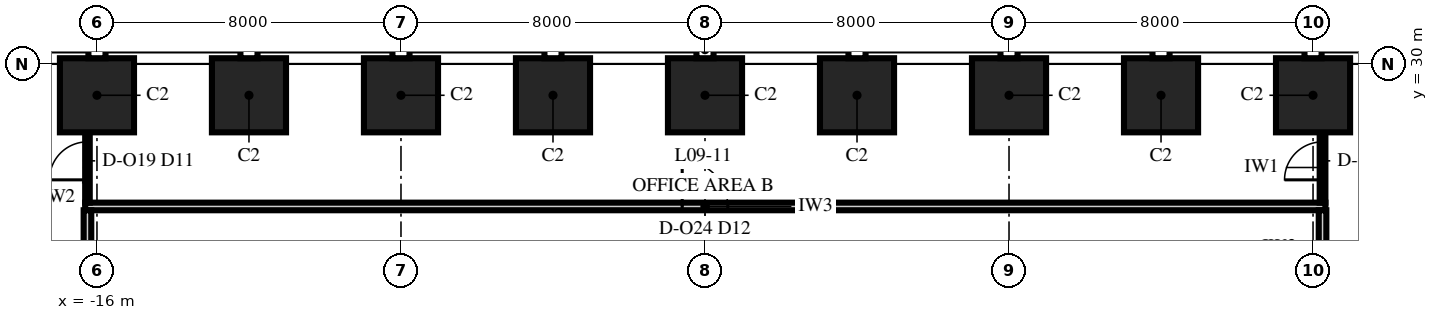
"""IFC4 building model, lengths in metres.
Left out: names, types, materials, properties, quantities, classifications, styles, units other than length and angle.
Written with IfcOpenShell. Run it as: python <this file> out.ifc"""

import sys

from ifc_helpers import new_model, si_unit, direction, frame, frame_2d, origin, origin_2d, place, context, subcontext, project, spatial, rectangle, extrude, element, fill, save


model = new_model("IFC4")
c1 = context("Model", 3, precision=1e-05, world=origin(), true_north=direction((0.0, 1.0)))
c2 = subcontext(c1, "Body", "Model", "MODEL_VIEW")
j1 = project(units=[si_unit("LENGTHUNIT", "METRE"), si_unit("PLANEANGLEUNIT", "RADIAN")], contexts=[c1])
p1 = place(None, origin())
s1 = spatial("IfcSite", under=j1, at=p1, CompositionType="ELEMENT")
p2 = place(p1, origin())
s2 = spatial("IfcBuilding", under=s1, at=p2, CompositionType="ELEMENT")
p3 = place(p2, frame((0.0, 0.0, 48.0)))
s3 = spatial("IfcBuildingStorey", under=s2, at=p3, CompositionType="ELEMENT", Elevation=48.0)
for number, where, z_axis, x_axis in (
    (1, (16.0, 29.175, 0.0), (0.0, 0.0, 1.0), (-1.0, 0.0, 0.0)),
    (2, (12.0, 29.175, 0.0), (0.0, 0.0, 1.0), (-1.0, 0.0, 0.0)),
    (3, (8.0, 29.175, 0.0), (0.0, 0.0, 1.0), (-1.0, 0.0, 0.0)),
    (4, (4.0, 29.175, 0.0), (0.0, 0.0, 1.0), (-1.0, 0.0, 0.0)),
    (5, (0.0, 29.175, 0.0), (0.0, 0.0, 1.0), (-1.0, 0.0, 0.0)),
    (6, (-4.0, 29.175, 0.0), (0.0, 0.0, 1.0), (-1.0, 0.0, 0.0)),
    (7, (-8.0, 29.175, 0.0), (0.0, 0.0, 1.0), (-1.0, 0.0, 0.0)),
    (8, (-12.0, 29.175, 0.0), (0.0, 0.0, 1.0), (-1.0, 0.0, 0.0)),
    (9, (-16.0, 29.175, 0.0), (0.0, 0.0, 1.0), (-1.0, 0.0, 0.0)),
):
    element("IfcColumn", number, at=place(p3, frame(where, z_axis=z_axis, x_axis=x_axis)), inside=s3, PredefinedType="COLUMN", context=c2, shape_type="SweptSolid", body=[
        extrude(rectangle(XDim=1.95, YDim=1.95, at=origin_2d()), origin(), (0.0, 0.0, 1.0), 4.0),
    ])
p4 = place(p3, frame((-16.31, 26.25, 0.0), z_axis=(0.0, 0.0, 1.0), x_axis=(1.0, 0.0, 0.0)))
e10 = element("IfcWall", 10, at=p4, inside=s3, PredefinedType="PARTITIONING", context=c2, shape_type="SweptSolid", body=[
    extrude(rectangle(XDim=32.635, YDim=0.2, at=frame_2d((16.317, 0.0))), origin(), (0.0, 0.0, 1.0), 3.4),
])
p5 = place(p4, frame((15.71, 0.0, 0.0)))
e11 = element("IfcOpeningElement", 11, at=p5, cuts=e10, PredefinedType="OPENING", context=c2, shape_type="SweptSolid", body=[
    extrude(rectangle(XDim=1.2, YDim=2.4, at=frame_2d((0.6, 1.2))), frame((0.0, 0.115, 0.0), z_axis=(0.0, -1.0, 0.0), x_axis=(1.0, 0.0, 0.0)), (0.0, 0.0, 1.0), 0.23),
])
p6 = place(p3, frame((-16.25, 3.85, 0.0), z_axis=(0.0, 0.0, 1.0), x_axis=(0.0, 1.0, 0.0)))
e12 = element("IfcWall", 12, at=p6, inside=s3, PredefinedType="PARTITIONING", context=c2, shape_type="SweptSolid", body=[
    extrude(rectangle(XDim=22.3, YDim=0.2, at=frame_2d((11.15, 0.0))), origin(), (0.0, 0.0, 1.0), 2.842),
])
p7 = place(p6, frame((4.55, 0.0, 0.0)))
e13 = element("IfcOpeningElement", 13, at=p7, cuts=e12, PredefinedType="OPENING", context=c2, shape_type="SweptSolid", body=[
    extrude(rectangle(XDim=1.2, YDim=2.4, at=frame_2d((0.6, 1.2))), frame((0.0, 0.115, 0.0), z_axis=(0.0, -1.0, 0.0), x_axis=(1.0, 0.0, 0.0)), (0.0, 0.0, 1.0), 0.23),
])
p8 = place(p3, frame((-16.25, 26.35, 0.0), z_axis=(0.0, 0.0, 1.0), x_axis=(0.0, 1.0, 0.0)))
e14 = element("IfcWall", 14, at=p8, inside=s3, PredefinedType="PARTITIONING", context=c2, shape_type="SweptSolid", body=[
    extrude(rectangle(XDim=1.85, YDim=0.12, at=frame_2d((0.925, 0.0))), origin(), (0.0, 0.0, 1.0), 3.85),
])
p9 = place(p8, frame((0.6, 0.0, 0.0)))
e15 = element("IfcOpeningElement", 15, at=p9, cuts=e14, PredefinedType="OPENING", context=c2, shape_type="SweptSolid", body=[
    extrude(rectangle(XDim=1.0, YDim=2.4, at=frame_2d((0.5, 1.2))), frame((0.0, 0.075, 0.0), z_axis=(0.0, -1.0, 0.0), x_axis=(1.0, 0.0, 0.0)), (0.0, 0.0, 1.0), 0.15),
])
p10 = place(p3, frame((16.25, 21.94, 0.0), z_axis=(0.0, 0.0, 1.0), x_axis=(0.0, 1.0, 0.0)))
e16 = element("IfcWall", 16, at=p10, inside=s3, PredefinedType="PARTITIONING", context=c2, shape_type="SweptSolid", body=[
    extrude(rectangle(XDim=4.21, YDim=0.2, at=frame_2d((2.105, 0.0))), origin(), (0.0, 0.0, 1.0), 3.4),
])
p11 = place(p3, frame((16.25, 26.35, 0.0), z_axis=(0.0, 0.0, 1.0), x_axis=(0.0, 1.0, 0.0)))
e17 = element("IfcWall", 17, at=p11, inside=s3, PredefinedType="PARTITIONING", context=c2, shape_type="SweptSolid", body=[
    extrude(rectangle(XDim=1.85, YDim=0.15, at=frame_2d((0.925, 0.0))), origin(), (0.0, 0.0, 1.0), 3.85),
])
p12 = place(p11, frame((0.6, 0.0, 0.0)))
e18 = element("IfcOpeningElement", 18, at=p12, cuts=e17, PredefinedType="OPENING", context=c2, shape_type="SweptSolid", body=[
    extrude(rectangle(XDim=1.0, YDim=2.3, at=frame_2d((0.5, 1.15))), frame((0.0, 0.09, 0.0), z_axis=(0.0, -1.0, 0.0), x_axis=(1.0, 0.0, 0.0)), (0.0, 0.0, 1.0), 0.18),
])
p13 = place(p9, origin())
e19 = element("IfcDoor", 19, at=p13, inside=s3, OperationType="SINGLE_SWING_RIGHT", PredefinedType="DOOR", context=c2, shape_type="SweptSolid", body=[
    extrude(rectangle(XDim=1.0, YDim=2.4, at=frame_2d((0.5, 1.2))), frame((0.0, 0.06, 0.0), z_axis=(0.0, -1.0, 0.0), x_axis=(1.0, 0.0, 0.0)), (0.0, 0.0, 1.0), 0.12),
])
fill(e15, e19)
p14 = place(p12, origin())
e20 = element("IfcDoor", 20, at=p14, inside=s3, OperationType="SINGLE_SWING_LEFT", PredefinedType="DOOR", context=c2, shape_type="SweptSolid", body=[
    extrude(rectangle(XDim=1.0, YDim=2.3, at=frame_2d((0.5, 1.15))), frame((0.0, 0.075, 0.0), z_axis=(0.0, -1.0, 0.0), x_axis=(1.0, 0.0, 0.0)), (0.0, 0.0, 1.0), 0.149),
])
fill(e18, e20)
p15 = place(p5, origin())
e21 = element("IfcDoor", 21, at=p15, inside=s3, OperationType="SINGLE_SWING_LEFT", PredefinedType="DOOR", context=c2, shape_type="SweptSolid", body=[
    extrude(rectangle(XDim=1.2, YDim=2.4, at=frame_2d((0.6, 1.2))), frame((0.0, 0.1, 0.0), z_axis=(0.0, -1.0, 0.0), x_axis=(1.0, 0.0, 0.0)), (0.0, 0.0, 1.0), 0.199),
])
fill(e11, e21)
save(model, sys.argv[1])
